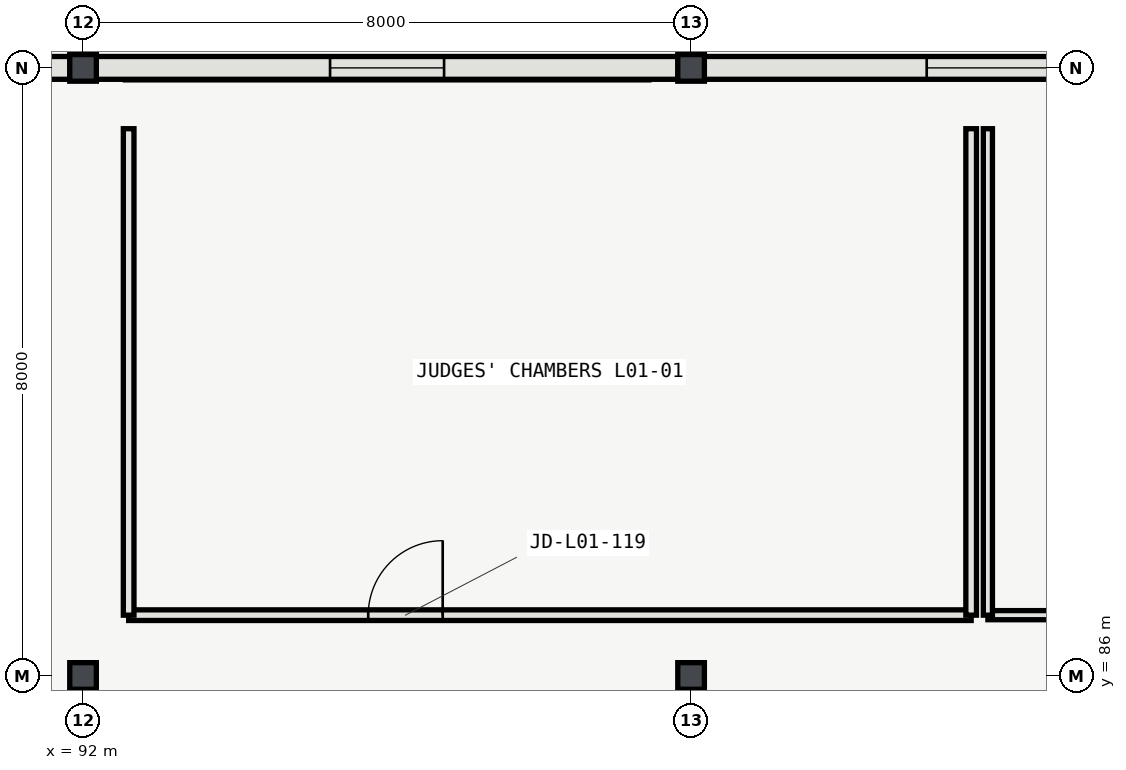
"""IFC4 building model, lengths in metres.
Left out: names, types, materials, properties, quantities, classifications, styles, units other than length and angle.
Written with IfcOpenShell. Run it as: python <this file> out.ifc"""

import sys

from ifc_helpers import new_model, si_unit, direction, frame, frame_2d, origin, origin_2d, place, context, subcontext, project, spatial, rectangle, i_section, extrude, element, fill, save


model = new_model("IFC4")
c1 = context("Model", 3, precision=1e-05, world=origin(), true_north=direction((0.0, 1.0)))
c2 = subcontext(c1, "Body", "Model", "MODEL_VIEW")
j1 = project(units=[si_unit("LENGTHUNIT", "METRE"), si_unit("PLANEANGLEUNIT", "RADIAN")], contexts=[c1])
p1 = place(None, origin())
s1 = spatial("IfcSite", under=j1, at=p1, CompositionType="ELEMENT")
p2 = place(p1, origin())
s2 = spatial("IfcBuilding", under=s1, at=p2, CompositionType="ELEMENT")
p3 = place(p2, frame((0.0, 0.0, 5.4)))
s3 = spatial("IfcBuildingStorey", under=s2, at=p3, CompositionType="ELEMENT", Elevation=5.4)
for number, where, z_axis, x_axis in (
    (1, (92.0, 86.0, 0.0), (0.0, 0.0, 1.0), (1.0, 0.0, 0.0)),
    (2, (92.0, 94.0, 0.0), (0.0, 0.0, 1.0), (1.0, 0.0, 0.0)),
    (3, (100.0, 86.0, 0.0), (0.0, 0.0, 1.0), (1.0, 0.0, 0.0)),
    (4, (100.0, 94.0, 0.0), (0.0, 0.0, 1.0), (1.0, 0.0, 0.0)),
):
    element("IfcColumn", number, at=place(p3, frame(where, z_axis=z_axis, x_axis=x_axis)), inside=s3, PredefinedType="COLUMN", context=c2, shape_type="SweptSolid", body=[
        extrude(i_section(OverallWidth=0.35, OverallDepth=0.35, WebThickness=0.012, FlangeThickness=0.019, FilletRadius=0.02, at=origin_2d()), origin(), (0.0, 0.0, 1.0), 5.4),
    ])
p4 = place(p3, frame((91.829, 94.0, 0.0), z_axis=(0.0, 0.0, 1.0), x_axis=(-1.0, 0.0, 0.0)))
e5 = element("IfcWall", 5, at=p4, inside=s3, PredefinedType="SOLIDWALL", context=c2, shape_type="SweptSolid", body=[
    extrude(rectangle(XDim=7.483, YDim=0.3, at=frame_2d((3.742, 0.0))), origin(), (0.0, 0.0, 1.0), 4.803),
])
p5 = place(p4, frame((2.629, 0.0, 0.95)))
e6 = element("IfcOpeningElement", 6, at=p5, cuts=e5, PredefinedType="OPENING", context=c2, shape_type="SweptSolid", body=[
    extrude(rectangle(XDim=2.4, YDim=2.6, at=frame_2d((1.2, 1.3))), frame((0.0, 0.16, 0.0), z_axis=(0.0, -1.0, 0.0), x_axis=(1.0, 0.0, 0.0)), (0.0, 0.0, 1.0), 0.32),
])
p6 = place(p3, frame((99.829, 94.0, 0.0), z_axis=(0.0, 0.0, 1.0), x_axis=(-1.0, 0.0, 0.0)))
e7 = element("IfcWall", 7, at=p6, inside=s3, PredefinedType="SOLIDWALL", context=c2, shape_type="SweptSolid", body=[
    extrude(rectangle(XDim=7.658, YDim=0.3, at=frame_2d((3.829, 0.0))), origin(), (0.0, 0.0, 1.0), 4.803),
])
p7 = place(p6, frame((3.079, 0.0, 0.95)))
e8 = element("IfcOpeningElement", 8, at=p7, cuts=e7, PredefinedType="OPENING", context=c2, shape_type="SweptSolid", body=[
    extrude(rectangle(XDim=1.5, YDim=1.2, at=frame_2d((0.75, 0.6))), frame((0.0, 0.16, 0.0), z_axis=(0.0, -1.0, 0.0), x_axis=(1.0, 0.0, 0.0)), (0.0, 0.0, 1.0), 0.32),
])
p8 = place(p3, frame((107.829, 94.0, 0.0), z_axis=(0.0, 0.0, 1.0), x_axis=(-1.0, 0.0, 0.0)))
e9 = element("IfcWall", 9, at=p8, inside=s3, PredefinedType="SOLIDWALL", context=c2, shape_type="SweptSolid", body=[
    extrude(rectangle(XDim=7.658, YDim=0.3, at=frame_2d((3.829, 0.0))), origin(), (0.0, 0.0, 1.0), 4.803),
])
p9 = place(p8, frame((2.929, 0.0, 0.95)))
e10 = element("IfcOpeningElement", 10, at=p9, cuts=e9, PredefinedType="OPENING", context=c2, shape_type="SweptSolid", body=[
    extrude(rectangle(XDim=1.8, YDim=1.2, at=frame_2d((0.9, 0.6))), frame((0.0, 0.16, 0.0), z_axis=(0.0, -1.0, 0.0), x_axis=(1.0, 0.0, 0.0)), (0.0, 0.0, 1.0), 0.32),
])
p10 = place(p3, frame((92.6, 86.8, 0.0), z_axis=(0.0, 0.0, 1.0), x_axis=(1.0, 0.0, 0.0)))
e11 = element("IfcWall", 11, at=p10, inside=s3, PredefinedType="PARTITIONING", context=c2, shape_type="SweptSolid", body=[
    extrude(rectangle(XDim=11.085, YDim=0.14, at=frame_2d((5.542, 0.0))), origin(), (0.0, 0.0, 1.0), 5.12),
])
p11 = place(p10, frame((3.152, 0.0, 0.0)))
e12 = element("IfcOpeningElement", 12, at=p11, cuts=e11, PredefinedType="OPENING", context=c2, shape_type="SweptSolid", body=[
    extrude(rectangle(XDim=0.98, YDim=2.15, at=frame_2d((0.49, 1.075))), frame((0.0, 0.08, 0.0), z_axis=(0.0, -1.0, 0.0), x_axis=(1.0, 0.0, 0.0)), (0.0, 0.0, 1.0), 0.16),
])
p12 = place(p3, frame((92.6, 93.2, 0.0), z_axis=(0.0, 0.0, 1.0), x_axis=(0.0, -1.0, 0.0)))
e13 = element("IfcWall", 13, at=p12, inside=s3, PredefinedType="PARTITIONING", context=c2, shape_type="SweptSolid", body=[
    extrude(rectangle(XDim=6.4, YDim=0.14, at=frame_2d((3.2, 0.0))), origin(), (0.0, 0.0, 1.0), 5.12),
])
p13 = place(p3, frame((103.685, 86.8, 0.0), z_axis=(0.0, 0.0, 1.0), x_axis=(0.0, 1.0, 0.0)))
e14 = element("IfcWall", 14, at=p13, inside=s3, PredefinedType="PARTITIONING", context=c2, shape_type="SweptSolid", body=[
    extrude(rectangle(XDim=6.4, YDim=0.14, at=frame_2d((3.2, 0.0))), origin(), (0.0, 0.0, 1.0), 4.756),
])
p14 = place(p3, frame((103.905, 86.8, 0.0), z_axis=(0.0, 0.0, 1.0), x_axis=(1.0, 0.0, 0.0)))
e15 = element("IfcWall", 15, at=p14, inside=s3, PredefinedType="PARTITIONING", context=c2, shape_type="SweptSolid", body=[
    extrude(rectangle(XDim=11.085, YDim=0.12, at=frame_2d((5.542, 0.0))), origin(), (0.0, 0.0, 1.0), 5.12),
])
p15 = place(p14, frame((7.888, 0.0, 0.0)))
e16 = element("IfcOpeningElement", 16, at=p15, cuts=e15, PredefinedType="OPENING", context=c2, shape_type="SweptSolid", body=[
    extrude(rectangle(XDim=1.0, YDim=2.2, at=frame_2d((0.5, 1.1))), frame((0.0, 0.07, 0.0), z_axis=(0.0, -1.0, 0.0), x_axis=(1.0, 0.0, 0.0)), (0.0, 0.0, 1.0), 0.14),
])
p16 = place(p3, frame((103.905, 93.2, 0.0), z_axis=(0.0, 0.0, 1.0), x_axis=(0.0, -1.0, 0.0)))
e17 = element("IfcWall", 17, at=p16, inside=s3, PredefinedType="PARTITIONING", context=c2, shape_type="SweptSolid", body=[
    extrude(rectangle(XDim=6.4, YDim=0.12, at=frame_2d((3.2, 0.0))), origin(), (0.0, 0.0, 1.0), 4.756),
])
p17 = place(p7, origin())
e18 = element("IfcWindow", 18, at=p17, inside=s3, PartitioningType="SINGLE_PANEL", PredefinedType="WINDOW", context=c2, shape_type="SweptSolid", body=[
    extrude(rectangle(XDim=1.5, YDim=1.2, at=frame_2d((0.75, 0.6))), frame((0.0, 0.03, 0.0), z_axis=(0.0, -1.0, 0.0), x_axis=(1.0, 0.0, 0.0)), (0.0, 0.0, 1.0), 0.06),
])
fill(e8, e18)
p18 = place(p9, origin())
e19 = element("IfcWindow", 19, at=p18, inside=s3, PartitioningType="SINGLE_PANEL", PredefinedType="WINDOW", context=c2, shape_type="SweptSolid", body=[
    extrude(rectangle(XDim=1.8, YDim=1.2, at=frame_2d((0.9, 0.6))), frame((0.0, 0.03, 0.0), z_axis=(0.0, -1.0, 0.0), x_axis=(1.0, 0.0, 0.0)), (0.0, 0.0, 1.0), 0.06),
])
fill(e10, e19)
p19 = place(p11, origin())
e20 = element("IfcDoor", 20, at=p19, inside=s3, OperationType="SINGLE_SWING_RIGHT", PredefinedType="DOOR", context=c2, shape_type="SweptSolid", body=[
    extrude(rectangle(XDim=0.98, YDim=2.15, at=frame_2d((0.49, 1.075))), frame((0.0, 0.025, 0.0), z_axis=(0.0, -1.0, 0.0), x_axis=(1.0, 0.0, 0.0)), (0.0, 0.0, 1.0), 0.05),
])
fill(e12, e20)
save(model, sys.argv[1])
